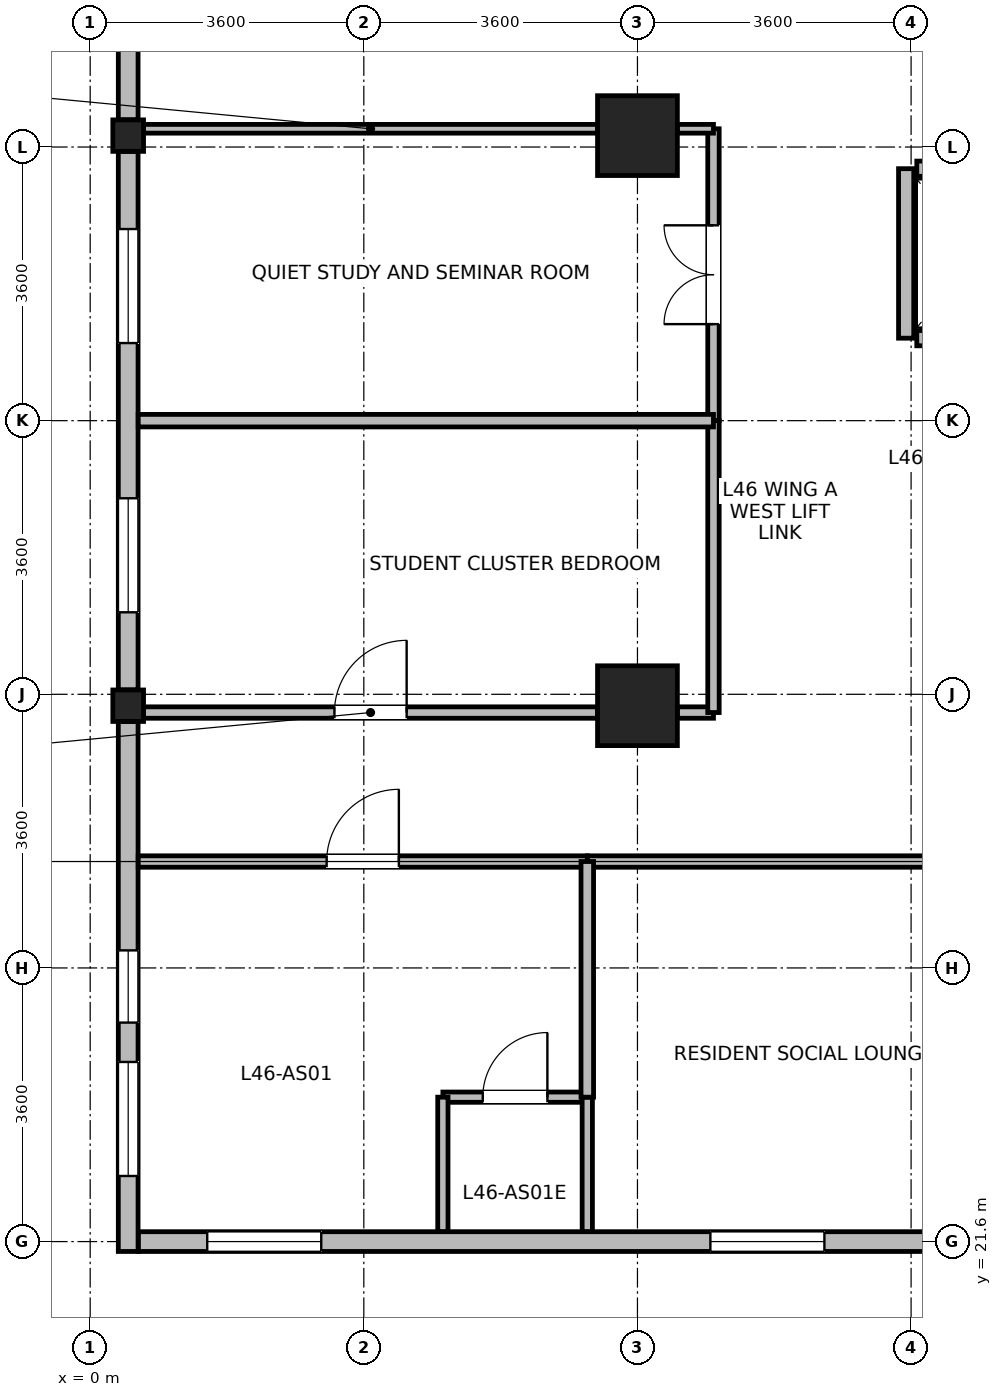
"""IFC4 building model, lengths in metres.
Left out: names, types, materials, properties, quantities, classifications, styles, units other than length and angle.
Written with IfcOpenShell. Run it as: python <this file> out.ifc"""

import sys

from ifc_helpers import new_model, si_unit, direction, frame, frame_2d, origin, origin_2d, place, context, subcontext, project, spatial, rectangle, i_section, extrude, source, transform, mapped, element, fill, save


model = new_model("IFC4")
c1 = context("Model", 3, precision=1e-05, world=origin(), true_north=direction((0.0, 1.0)))
c2 = subcontext(c1, "Body", "Model", "MODEL_VIEW")
j1 = project(units=[si_unit("LENGTHUNIT", "METRE"), si_unit("PLANEANGLEUNIT", "RADIAN")], contexts=[c1])
p1 = place(None, origin())
s1 = spatial("IfcSite", under=j1, at=p1, CompositionType="ELEMENT")
p2 = place(p1, origin())
s2 = spatial("IfcBuilding", under=s1, at=p2, CompositionType="ELEMENT")
p3 = place(p2, frame((0.0, 0.0, 180.9)))
s3 = spatial("IfcBuildingStorey", under=s2, at=p3, CompositionType="ELEMENT", Elevation=180.9)
m1 = source(origin(), c2, "Body", "SweptSolid", [
    extrude(rectangle(XDim=1.05, YDim=1.05, at=origin_2d()), origin(), (0.0, 0.0, 1.0), 3.7),
])
for number, where, z_axis, x_axis in (
    (1, (7.2, 28.65, 0.0), (0.0, 0.0, 1.0), (1.0, 0.0, 0.0)),
    (2, (7.2, 36.15, 0.0), (0.0, 0.0, 1.0), (1.0, 0.0, 0.0)),
):
    element("IfcColumn", number, at=place(p3, frame(where, z_axis=z_axis, x_axis=x_axis)), inside=s3, PredefinedType="COLUMN", context=c2, shape_type="MappedRepresentation", body=[
        mapped(m1, transform((0.0, 0.0, 0.0), x_axis=(1.0, 0.0, 0.0), y_axis=(0.0, 1.0, 0.0), z_axis=(0.0, 0.0, 1.0), scale=1.0)),
    ])
m2 = source(origin(), c2, "Body", "SweptSolid", [
    extrude(i_section(OverallWidth=0.404, OverallDepth=0.414, WebThickness=0.021, FlangeThickness=0.028, FilletRadius=0.015, at=origin_2d()), origin(), (0.0, 0.0, 1.0), 3.7),
])
for number, where, z_axis, x_axis in (
    (3, (0.5, 28.65, 0.0), (0.0, 0.0, 1.0), (1.0, 0.0, 0.0)),
    (4, (0.5, 36.15, 0.0), (0.0, 0.0, 1.0), (1.0, 0.0, 0.0)),
):
    element("IfcColumn", number, at=place(p3, frame(where, z_axis=z_axis, x_axis=x_axis)), inside=s3, PredefinedType="COLUMN", context=c2, shape_type="MappedRepresentation", body=[
        mapped(m2, transform((0.0, 0.0, 0.0), x_axis=(1.0, 0.0, 0.0), y_axis=(0.0, 1.0, 0.0), z_axis=(0.0, 0.0, 1.0), scale=1.0)),
    ])
p4 = place(p3, frame((0.5, 36.358, 0.0), z_axis=(0.0, 0.0, 1.0), x_axis=(0.0, 1.0, 0.0)))
e5 = element("IfcWall", 5, at=p4, inside=s3, PredefinedType="STANDARD", context=c2, shape_type="SweptSolid", body=[
    extrude(rectangle(XDim=3.372, YDim=0.26, at=frame_2d((1.686, 0.0))), origin(), (0.0, 0.0, 1.0), 3.44),
])
p5 = place(p4, frame((0.936, 0.0, 0.85)))
e6 = element("IfcOpeningElement", 6, at=p5, cuts=e5, PredefinedType="OPENING", context=c2, shape_type="SweptSolid", body=[
    extrude(rectangle(XDim=1.5, YDim=1.85, at=frame_2d((0.75, 0.925))), frame((0.0, 0.14, 0.0), z_axis=(0.0, -1.0, 0.0), x_axis=(1.0, 0.0, 0.0)), (0.0, 0.0, 1.0), 0.28),
])
p6 = place(p3, frame((0.5, 28.858, 0.0), z_axis=(0.0, 0.0, 1.0), x_axis=(0.0, 1.0, 0.0)))
e7 = element("IfcWall", 7, at=p6, inside=s3, PredefinedType="STANDARD", context=c2, shape_type="SweptSolid", body=[
    extrude(rectangle(XDim=7.084, YDim=0.26, at=frame_2d((3.542, 0.0))), origin(), (0.0, 0.0, 1.0), 2.99),
])
p7 = place(p6, frame((1.021, 0.0, 0.85)))
e8 = element("IfcOpeningElement", 8, at=p7, cuts=e7, PredefinedType="OPENING", context=c2, shape_type="SweptSolid", body=[
    extrude(rectangle(XDim=1.5, YDim=1.85, at=frame_2d((0.75, 0.925))), frame((0.0, 0.14, 0.0), z_axis=(0.0, -1.0, 0.0), x_axis=(1.0, 0.0, 0.0)), (0.0, 0.0, 1.0), 0.28),
])
p8 = place(p6, frame((4.563, 0.0, 0.85)))
e9 = element("IfcOpeningElement", 9, at=p8, cuts=e7, PredefinedType="OPENING", context=c2, shape_type="SweptSolid", body=[
    extrude(rectangle(XDim=1.5, YDim=1.85, at=frame_2d((0.75, 0.925))), frame((0.0, 0.14, 0.0), z_axis=(0.0, -1.0, 0.0), x_axis=(1.0, 0.0, 0.0)), (0.0, 0.0, 1.0), 0.28),
])
p9 = place(p3, frame((0.5, 21.47, 0.0), z_axis=(0.0, 0.0, 1.0), x_axis=(0.0, 1.0, 0.0)))
e10 = element("IfcWall", 10, at=p9, inside=s3, PredefinedType="STANDARD", context=c2, shape_type="SweptSolid", body=[
    extrude(rectangle(XDim=6.972, YDim=0.26, at=frame_2d((3.486, 0.0))), origin(), (0.0, 0.0, 1.0), 3.44),
])
p10 = place(p9, frame((0.993, 0.0, 0.85)))
e11 = element("IfcOpeningElement", 11, at=p10, cuts=e10, PredefinedType="OPENING", context=c2, shape_type="SweptSolid", body=[
    extrude(rectangle(XDim=1.5, YDim=1.85, at=frame_2d((0.75, 0.925))), frame((0.0, 0.14, 0.0), z_axis=(0.0, -1.0, 0.0), x_axis=(1.0, 0.0, 0.0)), (0.0, 0.0, 1.0), 0.28),
])
p11 = place(p9, frame((3.011, 0.0, 0.85)))
e12 = element("IfcOpeningElement", 12, at=p11, cuts=e10, PredefinedType="OPENING", context=c2, shape_type="SweptSolid", body=[
    extrude(rectangle(XDim=0.95, YDim=1.75, at=frame_2d((0.475, 0.875))), frame((0.0, 0.14, 0.0), z_axis=(0.0, -1.0, 0.0), x_axis=(1.0, 0.0, 0.0)), (0.0, 0.0, 1.0), 0.28),
])
p12 = place(p3, frame((13.874, 21.6, 0.0), z_axis=(0.0, 0.0, 1.0), x_axis=(-1.0, 0.0, 0.0)))
e13 = element("IfcWall", 13, at=p12, inside=s3, PredefinedType="STANDARD", context=c2, shape_type="SweptSolid", body=[
    extrude(rectangle(XDim=13.239, YDim=0.26, at=frame_2d((6.62, 0.0))), origin(), (0.0, 0.0, 1.0), 3.44),
])
p13 = place(p12, frame((0.905, 0.0, 0.85)))
e14 = element("IfcOpeningElement", 14, at=p13, cuts=e13, PredefinedType="OPENING", context=c2, shape_type="SweptSolid", body=[
    extrude(rectangle(XDim=1.5, YDim=1.85, at=frame_2d((0.75, 0.925))), frame((0.0, 0.14, 0.0), z_axis=(0.0, -1.0, 0.0), x_axis=(1.0, 0.0, 0.0)), (0.0, 0.0, 1.0), 0.28),
])
p14 = place(p12, frame((4.215, 0.0, 0.85)))
e15 = element("IfcOpeningElement", 15, at=p14, cuts=e13, PredefinedType="OPENING", context=c2, shape_type="SweptSolid", body=[
    extrude(rectangle(XDim=1.5, YDim=1.85, at=frame_2d((0.75, 0.925))), frame((0.0, 0.14, 0.0), z_axis=(0.0, -1.0, 0.0), x_axis=(1.0, 0.0, 0.0)), (0.0, 0.0, 1.0), 0.28),
])
p15 = place(p12, frame((10.834, 0.0, 0.85)))
e16 = element("IfcOpeningElement", 16, at=p15, cuts=e13, PredefinedType="OPENING", context=c2, shape_type="SweptSolid", body=[
    extrude(rectangle(XDim=1.5, YDim=1.85, at=frame_2d((0.75, 0.925))), frame((0.0, 0.14, 0.0), z_axis=(0.0, -1.0, 0.0), x_axis=(1.0, 0.0, 0.0)), (0.0, 0.0, 1.0), 0.28),
])
p16 = place(p3, frame((10.875, 33.485, 0.0), z_axis=(0.0, 0.0, 1.0), x_axis=(1.0, 0.0, 0.0)))
e17 = element("IfcWall", 17, at=p16, inside=s3, PredefinedType="PARTITIONING", context=c2, shape_type="SweptSolid", body=[
    extrude(rectangle(XDim=1.65, YDim=0.2, at=frame_2d((0.825, 0.0))), origin(), (0.0, 0.0, 1.0), 3.44),
])
p17 = place(p16, frame((0.275, 0.0, 0.0)))
e18 = element("IfcOpeningElement", 18, at=p17, cuts=e17, PredefinedType="OPENING", context=c2, shape_type="SweptSolid", body=[
    extrude(rectangle(XDim=1.1, YDim=2.12, at=frame_2d((0.55, 1.06))), frame((0.0, 0.11, 0.0), z_axis=(0.0, -1.0, 0.0), x_axis=(1.0, 0.0, 0.0)), (0.0, 0.0, 1.0), 0.22),
])
p18 = place(p3, frame((10.875, 35.715, 0.0), z_axis=(0.0, 0.0, 1.0), x_axis=(1.0, 0.0, 0.0)))
e19 = element("IfcWall", 19, at=p18, inside=s3, PredefinedType="PARTITIONING", context=c2, shape_type="SweptSolid", body=[
    extrude(rectangle(XDim=1.65, YDim=0.2, at=frame_2d((0.825, 0.0))), origin(), (0.0, 0.0, 1.0), 3.44),
])
p19 = place(p3, frame((10.735, 33.485, 0.0), z_axis=(0.0, 0.0, 1.0), x_axis=(0.0, 1.0, 0.0)))
e20 = element("IfcWall", 20, at=p19, inside=s3, PredefinedType="PARTITIONING", context=c2, shape_type="SweptSolid", body=[
    extrude(rectangle(XDim=2.23, YDim=0.2, at=frame_2d((1.115, 0.0))), origin(), (0.0, 0.0, 1.0), 3.44),
])
p20 = place(p3, frame((4.64, 23.5, 0.0), z_axis=(0.0, 0.0, 1.0), x_axis=(1.0, 0.0, 0.0)))
e21 = element("IfcWall", 21, at=p20, inside=s3, PredefinedType="PARTITIONING", context=c2, shape_type="SweptSolid", body=[
    extrude(rectangle(XDim=1.9, YDim=0.135, at=frame_2d((0.95, 0.0))), origin(), (0.0, 0.0, 1.0), 3.44),
])
p21 = place(p20, frame((0.525, 0.0, 0.0)))
e22 = element("IfcOpeningElement", 22, at=p21, cuts=e21, PredefinedType="OPENING", context=c2, shape_type="SweptSolid", body=[
    extrude(rectangle(XDim=0.85, YDim=2.04, at=frame_2d((0.425, 1.02))), frame((0.0, 0.078, 0.0), z_axis=(0.0, -1.0, 0.0), x_axis=(1.0, 0.0, 0.0)), (0.0, 0.0, 1.0), 0.155),
])
for number, where, z_axis, x_axis in (
    (23, (4.64, 21.732, 0.0), (0.0, 0.0, 1.0), (0.0, 1.0, 0.0)),
    (24, (6.54, 21.732, 0.0), (0.0, 0.0, 1.0), (0.0, 1.0, 0.0)),
):
    element("IfcWall", number, at=place(p3, frame(where, z_axis=z_axis, x_axis=x_axis)), inside=s3, PredefinedType="PARTITIONING", context=c2, shape_type="SweptSolid", body=[
        extrude(rectangle(XDim=1.768, YDim=0.135, at=frame_2d((0.884, 0.0))), origin(), (0.0, 0.0, 1.0), 3.44),
    ])
p22 = place(p3, frame((6.54, 26.6, 0.0), z_axis=(0.0, 0.0, 1.0), x_axis=(1.0, 0.0, 0.0)))
e25 = element("IfcWall", 25, at=p22, inside=s3, PredefinedType="PARTITIONING", context=c2, shape_type="SweptSolid", body=[
    extrude(rectangle(XDim=10.32, YDim=0.15, at=frame_2d((5.16, 0.0))), origin(), (0.0, 0.0, 1.0), 3.44),
])
p23 = place(p22, frame((4.51, 0.0, 0.0)))
e26 = element("IfcOpeningElement", 26, at=p23, cuts=e25, PredefinedType="OPENING", context=c2, shape_type="SweptSolid", body=[
    extrude(rectangle(XDim=1.3, YDim=2.12, at=frame_2d((0.65, 1.06))), frame((0.0, 0.085, 0.0), z_axis=(0.0, -1.0, 0.0), x_axis=(1.0, 0.0, 0.0)), (0.0, 0.0, 1.0), 0.17),
])
p24 = place(p3, frame((0.702, 28.56, 0.0), z_axis=(0.0, 0.0, 1.0), x_axis=(1.0, 0.0, 0.0)))
e27 = element("IfcWall", 27, at=p24, inside=s3, PredefinedType="PARTITIONING", context=c2, shape_type="SweptSolid", body=[
    extrude(rectangle(XDim=5.973, YDim=0.15, at=frame_2d((2.987, 0.0))), origin(), (0.0, 0.0, 1.0), 2.84),
])
p25 = place(p24, frame((2.511, 0.0, 0.0)))
e28 = element("IfcOpeningElement", 28, at=p25, cuts=e27, PredefinedType="OPENING", context=c2, shape_type="SweptSolid", body=[
    extrude(rectangle(XDim=0.95, YDim=2.1, at=frame_2d((0.475, 1.05))), frame((0.0, 0.085, 0.0), z_axis=(0.0, -1.0, 0.0), x_axis=(1.0, 0.0, 0.0)), (0.0, 0.0, 1.0), 0.17),
])
p26 = place(p3, frame((7.725, 28.56, 0.0), z_axis=(0.0, 0.0, 1.0), x_axis=(1.0, 0.0, 0.0)))
e29 = element("IfcWall", 29, at=p26, inside=s3, PredefinedType="PARTITIONING", context=c2, shape_type="SweptSolid", body=[
    extrude(rectangle(XDim=0.475, YDim=0.15, at=frame_2d((0.237, 0.0))), origin(), (0.0, 0.0, 1.0), 2.84),
])
p27 = place(p3, frame((0.632, 26.6, 0.0), z_axis=(0.0, 0.0, 1.0), x_axis=(1.0, 0.0, 0.0)))
e30 = element("IfcWall", 30, at=p27, inside=s3, PredefinedType="PARTITIONING", context=c2, shape_type="SweptSolid", body=[
    extrude(rectangle(XDim=5.908, YDim=0.15, at=frame_2d((2.954, 0.0))), origin(), (0.0, 0.0, 1.0), 3.44),
])
p28 = place(p27, frame((2.479, 0.0, 0.0)))
e31 = element("IfcOpeningElement", 31, at=p28, cuts=e30, PredefinedType="OPENING", context=c2, shape_type="SweptSolid", body=[
    extrude(rectangle(XDim=0.95, YDim=2.1, at=frame_2d((0.475, 1.05))), frame((0.0, 0.085, 0.0), z_axis=(0.0, -1.0, 0.0), x_axis=(1.0, 0.0, 0.0)), (0.0, 0.0, 1.0), 0.17),
])
p29 = place(p3, frame((8.2, 32.4, 0.0), z_axis=(0.0, 0.0, 1.0), x_axis=(0.0, 1.0, 0.0)))
e32 = element("IfcWall", 32, at=p29, inside=s3, PredefinedType="PARTITIONING", context=c2, shape_type="SweptSolid", body=[
    extrude(rectangle(XDim=3.84, YDim=0.15, at=frame_2d((1.92, 0.0))), origin(), (0.0, 0.0, 1.0), 3.44),
])
p30 = place(p29, frame((1.27, 0.0, 0.0)))
e33 = element("IfcOpeningElement", 33, at=p30, cuts=e32, PredefinedType="OPENING", context=c2, shape_type="SweptSolid", body=[
    extrude(rectangle(XDim=1.3, YDim=2.12, at=frame_2d((0.65, 1.06))), frame((0.0, 0.085, 0.0), z_axis=(0.0, -1.0, 0.0), x_axis=(1.0, 0.0, 0.0)), (0.0, 0.0, 1.0), 0.17),
])
p31 = place(p3, frame((8.2, 28.56, 0.0), z_axis=(0.0, 0.0, 1.0), x_axis=(0.0, 1.0, 0.0)))
e34 = element("IfcWall", 34, at=p31, inside=s3, PredefinedType="PARTITIONING", context=c2, shape_type="SweptSolid", body=[
    extrude(rectangle(XDim=3.84, YDim=0.15, at=frame_2d((1.92, 0.0))), origin(), (0.0, 0.0, 1.0), 3.44),
])
p32 = place(p3, frame((0.632, 32.4, 0.0), z_axis=(0.0, 0.0, 1.0), x_axis=(1.0, 0.0, 0.0)))
e35 = element("IfcWall", 35, at=p32, inside=s3, PredefinedType="PARTITIONING", context=c2, shape_type="SweptSolid", body=[
    extrude(rectangle(XDim=7.568, YDim=0.165, at=frame_2d((3.784, 0.0))), origin(), (0.0, 0.0, 1.0), 3.44),
])
p33 = place(p3, frame((0.702, 36.24, 0.0), z_axis=(0.0, 0.0, 1.0), x_axis=(1.0, 0.0, 0.0)))
e36 = element("IfcWall", 36, at=p33, inside=s3, PredefinedType="PARTITIONING", context=c2, shape_type="SweptSolid", body=[
    extrude(rectangle(XDim=5.973, YDim=0.115, at=frame_2d((2.987, 0.0))), origin(), (0.0, 0.0, 1.0), 2.84),
])
p34 = place(p3, frame((7.725, 36.24, 0.0), z_axis=(0.0, 0.0, 1.0), x_axis=(1.0, 0.0, 0.0)))
e37 = element("IfcWall", 37, at=p34, inside=s3, PredefinedType="PARTITIONING", context=c2, shape_type="SweptSolid", body=[
    extrude(rectangle(XDim=0.475, YDim=0.115, at=frame_2d((0.237, 0.0))), origin(), (0.0, 0.0, 1.0), 2.84),
])
p35 = place(p3, frame((6.54, 23.5, 0.0), z_axis=(0.0, 0.0, 1.0), x_axis=(0.0, 1.0, 0.0)))
e38 = element("IfcWall", 38, at=p35, inside=s3, PredefinedType="PARTITIONING", context=c2, shape_type="SweptSolid", body=[
    extrude(rectangle(XDim=3.1, YDim=0.165, at=frame_2d((1.55, 0.0))), origin(), (0.0, 0.0, 1.0), 3.44),
])
p36 = place(p7, origin())
e39 = element("IfcWindow", 39, at=p36, inside=s3, PartitioningType="SINGLE_PANEL", PredefinedType="WINDOW", context=c2, shape_type="SweptSolid", body=[
    extrude(rectangle(XDim=1.5, YDim=1.85, at=frame_2d((0.75, 0.925))), frame((0.0, 0.03, 0.0), z_axis=(0.0, -1.0, 0.0), x_axis=(1.0, 0.0, 0.0)), (0.0, 0.0, 1.0), 0.06),
])
fill(e8, e39)
p37 = place(p8, origin())
e40 = element("IfcWindow", 40, at=p37, inside=s3, PartitioningType="SINGLE_PANEL", PredefinedType="WINDOW", context=c2, shape_type="SweptSolid", body=[
    extrude(rectangle(XDim=1.5, YDim=1.85, at=frame_2d((0.75, 0.925))), frame((0.0, 0.03, 0.0), z_axis=(0.0, -1.0, 0.0), x_axis=(1.0, 0.0, 0.0)), (0.0, 0.0, 1.0), 0.06),
])
fill(e9, e40)
p38 = place(p10, origin())
e41 = element("IfcWindow", 41, at=p38, inside=s3, PartitioningType="SINGLE_PANEL", PredefinedType="WINDOW", context=c2, shape_type="SweptSolid", body=[
    extrude(rectangle(XDim=1.5, YDim=1.85, at=frame_2d((0.75, 0.925))), frame((0.0, 0.03, 0.0), z_axis=(0.0, -1.0, 0.0), x_axis=(1.0, 0.0, 0.0)), (0.0, 0.0, 1.0), 0.06),
])
fill(e11, e41)
p39 = place(p11, origin())
e42 = element("IfcWindow", 42, at=p39, inside=s3, PartitioningType="SINGLE_PANEL", PredefinedType="WINDOW", context=c2, shape_type="SweptSolid", body=[
    extrude(rectangle(XDim=0.95, YDim=1.75, at=frame_2d((0.475, 0.875))), frame((0.0, 0.03, 0.0), z_axis=(0.0, -1.0, 0.0), x_axis=(1.0, 0.0, 0.0)), (0.0, 0.0, 1.0), 0.06),
])
fill(e12, e42)
p40 = place(p14, origin())
e43 = element("IfcWindow", 43, at=p40, inside=s3, PartitioningType="SINGLE_PANEL", PredefinedType="WINDOW", context=c2, shape_type="SweptSolid", body=[
    extrude(rectangle(XDim=1.5, YDim=1.85, at=frame_2d((0.75, 0.925))), frame((0.0, 0.03, 0.0), z_axis=(0.0, -1.0, 0.0), x_axis=(1.0, 0.0, 0.0)), (0.0, 0.0, 1.0), 0.06),
])
fill(e15, e43)
p41 = place(p15, origin())
e44 = element("IfcWindow", 44, at=p41, inside=s3, PartitioningType="SINGLE_PANEL", PredefinedType="WINDOW", context=c2, shape_type="SweptSolid", body=[
    extrude(rectangle(XDim=1.5, YDim=1.85, at=frame_2d((0.75, 0.925))), frame((0.0, 0.03, 0.0), z_axis=(0.0, -1.0, 0.0), x_axis=(1.0, 0.0, 0.0)), (0.0, 0.0, 1.0), 0.06),
])
fill(e16, e44)
p42 = place(p21, origin())
e45 = element("IfcDoor", 45, at=p42, inside=s3, OperationType="SINGLE_SWING_RIGHT", PredefinedType="DOOR", context=c2, shape_type="SweptSolid", body=[
    extrude(rectangle(XDim=0.85, YDim=2.04, at=frame_2d((0.425, 1.02))), frame((0.0, 0.025, 0.0), z_axis=(0.0, -1.0, 0.0), x_axis=(1.0, 0.0, 0.0)), (0.0, 0.0, 1.0), 0.05),
])
fill(e22, e45)
p43 = place(p25, origin())
e46 = element("IfcDoor", 46, at=p43, inside=s3, OperationType="SINGLE_SWING_RIGHT", PredefinedType="DOOR", context=c2, shape_type="SweptSolid", body=[
    extrude(rectangle(XDim=0.95, YDim=2.1, at=frame_2d((0.475, 1.05))), frame((0.0, 0.025, 0.0), z_axis=(0.0, -1.0, 0.0), x_axis=(1.0, 0.0, 0.0)), (0.0, 0.0, 1.0), 0.05),
])
fill(e28, e46)
p44 = place(p28, origin())
e47 = element("IfcDoor", 47, at=p44, inside=s3, OperationType="SINGLE_SWING_RIGHT", PredefinedType="DOOR", context=c2, shape_type="SweptSolid", body=[
    extrude(rectangle(XDim=0.95, YDim=2.1, at=frame_2d((0.475, 1.05))), frame((0.0, 0.025, 0.0), z_axis=(0.0, -1.0, 0.0), x_axis=(1.0, 0.0, 0.0)), (0.0, 0.0, 1.0), 0.05),
])
fill(e31, e47)
p45 = place(p30, origin())
e48 = element("IfcDoor", 48, at=p45, inside=s3, OperationType="DOUBLE_DOOR_SINGLE_SWING", PredefinedType="DOOR", context=c2, shape_type="SweptSolid", body=[
    extrude(rectangle(XDim=1.3, YDim=2.12, at=frame_2d((0.65, 1.06))), frame((0.0, 0.025, 0.0), z_axis=(0.0, -1.0, 0.0), x_axis=(1.0, 0.0, 0.0)), (0.0, 0.0, 1.0), 0.05),
])
fill(e33, e48)
save(model, sys.argv[1])
